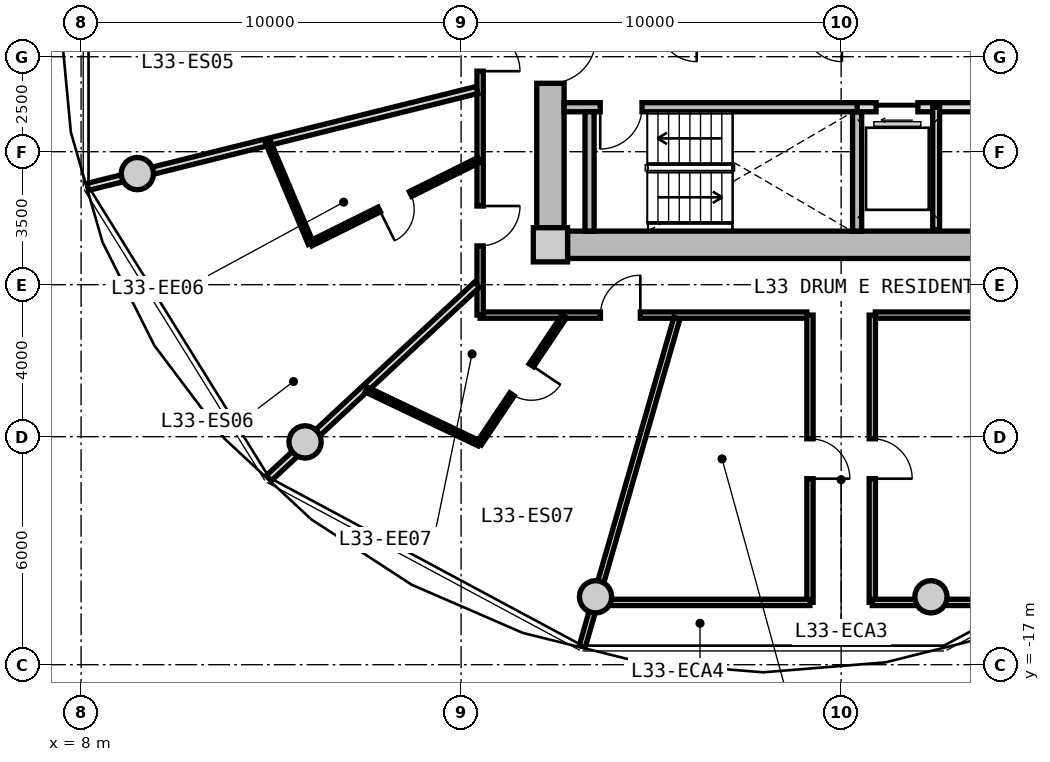
"""IFC4 building model, lengths in metres.
Left out: names, types, materials, properties, quantities, classifications, styles, units other than length and angle.
Written with IfcOpenShell. Run it as: python <this file> out.ifc"""

import sys

from ifc_helpers import new_model, si_unit, direction, frame, frame_2d, origin, origin_2d, place, context, subcontext, project, spatial, rectangle, circle, extrude, source, transform, mapped, element, fill, save


model = new_model("IFC4")
c1 = context("Model", 3, precision=1e-05, world=origin(), true_north=direction((0.0, 1.0)))
c2 = subcontext(c1, "Body", "Model", "MODEL_VIEW")
j1 = project(units=[si_unit("LENGTHUNIT", "METRE"), si_unit("PLANEANGLEUNIT", "RADIAN")], contexts=[c1])
p1 = place(None, origin())
s1 = spatial("IfcSite", under=j1, at=p1, CompositionType="ELEMENT")
p2 = place(p1, origin())
s2 = spatial("IfcBuilding", under=s1, at=p2, CompositionType="ELEMENT")
p3 = place(p2, frame((0.0, 0.0, 108.45)))
s3 = spatial("IfcBuildingStorey", under=s2, at=p3, CompositionType="ELEMENT", Elevation=108.45)
m1 = source(origin(), c2, "Body", "SweptSolid", [
    extrude(rectangle(XDim=0.9, YDim=0.9, at=origin_2d()), origin(), (0.0, 0.0, 1.0), 3.05),
])
p4 = place(p3, frame((20.35, -5.95, 0.0), z_axis=(0.0, 0.0, 1.0), x_axis=(1.0, 0.0, 0.0)))
e1 = element("IfcColumn", 1, at=p4, inside=s3, PredefinedType="COLUMN", context=c2, shape_type="MappedRepresentation", body=[
    mapped(m1, transform((0.0, 0.0, 0.0), x_axis=(1.0, 0.0, 0.0), y_axis=(0.0, 1.0, 0.0), z_axis=(0.0, 0.0, 1.0), scale=1.0)),
])
m2 = source(origin(), c2, "Body", "SweptSolid", [
    extrude(rectangle(XDim=14.4, YDim=0.72, at=frame_2d((7.2, 0.0))), origin(), (0.0, 0.0, 1.0), 2.79),
])
p5 = place(p3, frame((35.2, -5.95, 0.0), z_axis=(0.0, 0.0, 1.0), x_axis=(-1.0, 0.0, 0.0)))
e2 = element("IfcWall", 2, at=p5, inside=s3, PredefinedType="SHEAR", context=c2, shape_type="MappedRepresentation", body=[
    mapped(m2, transform((0.0, 0.0, 0.0), x_axis=(1.0, 0.0, 0.0), y_axis=(0.0, 1.0, 0.0), z_axis=(0.0, 0.0, 1.0), scale=1.0)),
])
m3 = source(origin(), c2, "Body", "SweptSolid", [
    extrude(rectangle(XDim=11.0, YDim=0.72, at=frame_2d((5.5, 0.0))), origin(), (0.0, 0.0, 1.0), 2.79),
])
p6 = place(p3, frame((20.35, -5.5, 0.0), z_axis=(0.0, 0.0, 1.0), x_axis=(0.0, 1.0, 0.0)))
e3 = element("IfcWall", 3, at=p6, inside=s3, PredefinedType="SHEAR", context=c2, shape_type="MappedRepresentation", body=[
    mapped(m3, transform((0.0, 0.0, 0.0), x_axis=(1.0, 0.0, 0.0), y_axis=(0.0, 1.0, 0.0), z_axis=(0.0, 0.0, 1.0), scale=1.0)),
])
p7 = place(p6, frame((3.8, 0.0, 0.0)))
e4 = element("IfcOpeningElement", 4, at=p7, cuts=e3, PredefinedType="OPENING", context=c2, shape_type="SweptSolid", body=[
    extrude(rectangle(XDim=1.2, YDim=2.15, at=frame_2d((0.6, 1.075))), frame((0.0, 0.37, 0.0), z_axis=(0.0, -1.0, 0.0), x_axis=(1.0, 0.0, 0.0)), (0.0, 0.0, 1.0), 0.74),
])
m4 = source(origin(), c2, "Body", "SweptSolid", [
    extrude(circle(Radius=0.425, at=origin_2d()), origin(), (0.0, 0.0, 1.0), 3.05),
])
for number, where, z_axis, x_axis in (
    (5, (9.481, -4.076, 0.0), (0.0, 0.0, 1.0), (1.0, 0.0, 0.0)),
    (6, (13.894, -11.137, 0.0), (0.0, 0.0, 1.0), (1.0, 0.0, 0.0)),
    (7, (21.537, -15.213, 0.0), (0.0, 0.0, 1.0), (1.0, 0.0, 0.0)),
    (8, (30.363, -15.213, 0.0), (0.0, 0.0, 1.0), (1.0, 0.0, 0.0)),
):
    element("IfcColumn", number, at=place(p3, frame(where, z_axis=z_axis, x_axis=x_axis)), inside=s3, PredefinedType="COLUMN", context=c2, shape_type="MappedRepresentation", body=[
        mapped(m4, transform((0.0, 0.0, 0.0), x_axis=(1.0, 0.0, 0.0), y_axis=(0.0, 1.0, 0.0), z_axis=(0.0, 0.0, 1.0), scale=1.0)),
    ])
m5 = source(origin(), c2, "Body", "SweptSolid", [
    extrude(rectangle(XDim=7.83, YDim=0.24, at=frame_2d((3.915, 0.0))), origin(), (0.0, 0.0, 1.0), 2.79),
])
p8 = place(p3, frame((20.71, -2.33, 0.0), z_axis=(0.0, 0.0, 1.0), x_axis=(1.0, 0.0, 0.0)))
e9 = element("IfcWall", 9, at=p8, inside=s3, PredefinedType="PARTITIONING", context=c2, shape_type="MappedRepresentation", body=[
    mapped(m5, transform((0.0, 0.0, 0.0), x_axis=(1.0, 0.0, 0.0), y_axis=(0.0, 1.0, 0.0), z_axis=(0.0, 0.0, 1.0), scale=1.0)),
])
p9 = place(p8, frame((0.95, 0.0, 0.0)))
e10 = element("IfcOpeningElement", 10, at=p9, cuts=e9, PredefinedType="OPENING", context=c2, shape_type="SweptSolid", body=[
    extrude(rectangle(XDim=1.1, YDim=2.15, at=frame_2d((0.55, 1.075))), frame((0.0, 0.13, 0.0), z_axis=(0.0, -1.0, 0.0), x_axis=(1.0, 0.0, 0.0)), (0.0, 0.0, 1.0), 0.26),
])
m6 = source(origin(), c2, "Body", "SweptSolid", [
    extrude(rectangle(XDim=3.14, YDim=0.24, at=frame_2d((1.57, 0.0))), origin(), (0.0, 0.0, 1.0), 2.79),
])
for number, where, z_axis, x_axis in (
    (11, (21.38, -5.59, 0.0), (0.0, 0.0, 1.0), (0.0, 1.0, 0.0)),
    (12, (28.42, -5.59, 0.0), (0.0, 0.0, 1.0), (0.0, 1.0, 0.0)),
):
    element("IfcWall", number, at=place(p3, frame(where, z_axis=z_axis, x_axis=x_axis)), inside=s3, PredefinedType="PARTITIONING", context=c2, shape_type="MappedRepresentation", body=[
        mapped(m6, transform((0.0, 0.0, 0.0), x_axis=(1.0, 0.0, 0.0), y_axis=(0.0, 1.0, 0.0), z_axis=(0.0, 0.0, 1.0), scale=1.0)),
    ])
m7 = source(origin(), c2, "Body", "SweptSolid", [
    extrude(rectangle(XDim=4.13, YDim=0.24, at=frame_2d((2.065, 0.0))), origin(), (0.0, 0.0, 1.0), 2.775),
])
p10 = place(p3, frame((28.42, -2.33, 0.0), z_axis=(0.0, 0.0, 1.0), x_axis=(1.0, 0.0, 0.0)))
e13 = element("IfcWall", 13, at=p10, inside=s3, PredefinedType="PARTITIONING", context=c2, shape_type="MappedRepresentation", body=[
    mapped(m7, transform((0.0, 0.0, 0.0), x_axis=(1.0, 0.0, 0.0), y_axis=(0.0, 1.0, 0.0), z_axis=(0.0, 0.0, 1.0), scale=1.0)),
])
p11 = place(p10, frame((0.5, 0.0, 0.0)))
e14 = element("IfcOpeningElement", 14, at=p11, cuts=e13, PredefinedType="OPENING", context=c2, shape_type="SweptSolid", body=[
    extrude(rectangle(XDim=1.1, YDim=2.2, at=frame_2d((0.55, 1.1))), frame((0.0, 0.13, 0.0), z_axis=(0.0, -1.0, 0.0), x_axis=(1.0, 0.0, 0.0)), (0.0, 0.0, 1.0), 0.26),
])
m8 = source(origin(), c2, "Body", "SweptSolid", [
    extrude(rectangle(XDim=3.22, YDim=0.18, at=frame_2d((1.61, 0.0))), origin(), (0.0, 0.0, 1.0), 2.775),
])
p12 = place(p3, frame((30.5, -5.55, 0.0), z_axis=(0.0, 0.0, 1.0), x_axis=(0.0, 1.0, 0.0)))
e15 = element("IfcWall", 15, at=p12, inside=s3, PredefinedType="PARTITIONING", context=c2, shape_type="MappedRepresentation", body=[
    mapped(m8, transform((0.0, 0.0, 0.0), x_axis=(1.0, 0.0, 0.0), y_axis=(0.0, 1.0, 0.0), z_axis=(0.0, 0.0, 1.0), scale=1.0)),
])
m9 = source(origin(), c2, "Body", "SweptSolid", [
    extrude(rectangle(XDim=8.6, YDim=0.165, at=frame_2d((4.3, 0.0))), origin(), (0.0, 0.0, 1.0), 2.775),
])
p13 = place(p3, frame((37.5, -7.8, 0.0), z_axis=(0.0, 0.0, 1.0), x_axis=(-1.0, 0.0, 0.0)))
e16 = element("IfcWall", 16, at=p13, inside=s3, PredefinedType="PARTITIONING", context=c2, shape_type="MappedRepresentation", body=[
    mapped(m9, transform((0.0, 0.0, 0.0), x_axis=(1.0, 0.0, 0.0), y_axis=(0.0, 1.0, 0.0), z_axis=(0.0, 0.0, 1.0), scale=1.0)),
])
p14 = place(p3, frame((27.1, -7.8, 0.0), z_axis=(0.0, 0.0, 1.0), x_axis=(-1.0, 0.0, 0.0)))
e17 = element("IfcWall", 17, at=p14, inside=s3, PredefinedType="PARTITIONING", context=c2, shape_type="MappedRepresentation", body=[
    mapped(m9, transform((0.0, 0.0, 0.0), x_axis=(1.0, 0.0, 0.0), y_axis=(0.0, 1.0, 0.0), z_axis=(0.0, 0.0, 1.0), scale=1.0)),
])
p15 = place(p14, frame((4.384, 0.0, 0.0)))
e18 = element("IfcOpeningElement", 18, at=p15, cuts=e17, PredefinedType="OPENING", context=c2, shape_type="SweptSolid", body=[
    extrude(rectangle(XDim=1.05, YDim=2.15, at=frame_2d((0.525, 1.075))), frame((0.0, 0.093, 0.0), z_axis=(0.0, -1.0, 0.0), x_axis=(1.0, 0.0, 0.0)), (0.0, 0.0, 1.0), 0.185),
])
m10 = source(origin(), c2, "Body", "SweptSolid", [
    extrude(rectangle(XDim=15.6, YDim=0.165, at=frame_2d((7.8, 0.0))), origin(), (0.0, 0.0, 1.0), 2.775),
])
p16 = place(p3, frame((18.5, -7.8, 0.0), z_axis=(0.0, 0.0, 1.0), x_axis=(0.0, 1.0, 0.0)))
e19 = element("IfcWall", 19, at=p16, inside=s3, PredefinedType="PARTITIONING", context=c2, shape_type="MappedRepresentation", body=[
    mapped(m10, transform((0.0, 0.0, 0.0), x_axis=(1.0, 0.0, 0.0), y_axis=(0.0, 1.0, 0.0), z_axis=(0.0, 0.0, 1.0), scale=1.0)),
])
p17 = place(p16, frame((10.383, 0.0, 0.0)))
e20 = element("IfcOpeningElement", 20, at=p17, cuts=e19, PredefinedType="OPENING", context=c2, shape_type="SweptSolid", body=[
    extrude(rectangle(XDim=1.05, YDim=2.15, at=frame_2d((0.525, 1.075))), frame((0.0, 0.093, 0.0), z_axis=(0.0, -1.0, 0.0), x_axis=(1.0, 0.0, 0.0)), (0.0, 0.0, 1.0), 0.185),
])
p18 = place(p16, frame((6.419, 0.0, 0.0)))
e21 = element("IfcOpeningElement", 21, at=p18, cuts=e19, PredefinedType="OPENING", context=c2, shape_type="SweptSolid", body=[
    extrude(rectangle(XDim=1.05, YDim=2.15, at=frame_2d((0.525, 1.075))), frame((0.0, 0.093, 0.0), z_axis=(0.0, -1.0, 0.0), x_axis=(1.0, 0.0, 0.0)), (0.0, 0.0, 1.0), 0.185),
])
p19 = place(p16, frame((1.821, 0.0, 0.0)))
e22 = element("IfcOpeningElement", 22, at=p19, cuts=e19, PredefinedType="OPENING", context=c2, shape_type="SweptSolid", body=[
    extrude(rectangle(XDim=1.05, YDim=2.15, at=frame_2d((0.525, 1.075))), frame((0.0, 0.093, 0.0), z_axis=(0.0, -1.0, 0.0), x_axis=(1.0, 0.0, 0.0)), (0.0, 0.0, 1.0), 0.185),
])
m11 = source(origin(), c2, "Body", "SweptSolid", [
    extrude(rectangle(XDim=8.989, YDim=0.165, at=frame_2d((4.495, 0.0))), origin(), (0.0, 0.0, 1.0), 2.275),
])
p20 = place(p3, frame((23.678, -7.88, 0.0), z_axis=(0.0, 0.0, 1.0), x_axis=(-0.27702323008, -0.960863221274, 0.0)))
e23 = element("IfcWall", 23, at=p20, inside=s3, PredefinedType="PARTITIONING", context=c2, shape_type="MappedRepresentation", body=[
    mapped(m11, transform((0.0, 0.0, 0.0), x_axis=(1.0, 0.0, 0.0), y_axis=(0.0, 1.0, 0.0), z_axis=(0.0, 0.0, 1.0), scale=1.0)),
])
m12 = source(origin(), c2, "Body", "SweptSolid", [
    extrude(rectangle(XDim=7.56, YDim=0.165, at=frame_2d((3.78, 0.0))), origin(), (0.0, 0.0, 1.0), 2.775),
])
p21 = place(p3, frame((27.18, -15.36, 0.0), z_axis=(0.0, 0.0, 1.0), x_axis=(0.0, 1.0, 0.0)))
e24 = element("IfcWall", 24, at=p21, inside=s3, PredefinedType="PARTITIONING", context=c2, shape_type="MappedRepresentation", body=[
    mapped(m12, transform((0.0, 0.0, 0.0), x_axis=(1.0, 0.0, 0.0), y_axis=(0.0, 1.0, 0.0), z_axis=(0.0, 0.0, 1.0), scale=1.0)),
])
p22 = place(p21, frame((3.255, 0.0, 0.0)))
e25 = element("IfcOpeningElement", 25, at=p22, cuts=e24, PredefinedType="OPENING", context=c2, shape_type="SweptSolid", body=[
    extrude(rectangle(XDim=1.05, YDim=2.15, at=frame_2d((0.525, 1.075))), frame((0.0, 0.093, 0.0), z_axis=(0.0, -1.0, 0.0), x_axis=(1.0, 0.0, 0.0)), (0.0, 0.0, 1.0), 0.185),
])
m13 = source(origin(), c2, "Body", "SweptSolid", [
    extrude(rectangle(XDim=5.814, YDim=0.165, at=frame_2d((2.907, 0.0))), origin(), (0.0, 0.0, 1.0), 2.275),
])
p23 = place(p3, frame((21.366, -15.36, 0.0), z_axis=(0.0, 0.0, 1.0), x_axis=(1.0, 0.0, 0.0)))
e26 = element("IfcWall", 26, at=p23, inside=s3, PredefinedType="PARTITIONING", context=c2, shape_type="MappedRepresentation", body=[
    mapped(m13, transform((0.0, 0.0, 0.0), x_axis=(1.0, 0.0, 0.0), y_axis=(0.0, 1.0, 0.0), z_axis=(0.0, 0.0, 1.0), scale=1.0)),
])
p24 = place(p3, frame((28.82, -15.36, 0.0), z_axis=(0.0, 0.0, 1.0), x_axis=(0.0, 1.0, 0.0)))
e27 = element("IfcWall", 27, at=p24, inside=s3, PredefinedType="PARTITIONING", context=c2, shape_type="MappedRepresentation", body=[
    mapped(m12, transform((0.0, 0.0, 0.0), x_axis=(1.0, 0.0, 0.0), y_axis=(0.0, 1.0, 0.0), z_axis=(0.0, 0.0, 1.0), scale=1.0)),
])
p25 = place(p24, frame((3.255, 0.0, 0.0)))
e28 = element("IfcOpeningElement", 28, at=p25, cuts=e27, PredefinedType="OPENING", context=c2, shape_type="SweptSolid", body=[
    extrude(rectangle(XDim=1.05, YDim=2.15, at=frame_2d((0.525, 1.075))), frame((0.0, 0.093, 0.0), z_axis=(0.0, -1.0, 0.0), x_axis=(1.0, 0.0, 0.0)), (0.0, 0.0, 1.0), 0.185),
])
m14 = source(origin(), c2, "Body", "SweptSolid", [
    extrude(rectangle(XDim=4.307, YDim=0.165, at=frame_2d((2.153, 0.0))), origin(), (0.0, 0.0, 1.0), 2.275),
])
p26 = place(p3, frame((28.82, -15.36, 0.0), z_axis=(0.0, 0.0, 1.0), x_axis=(1.0, 0.0, 0.0)))
e29 = element("IfcWall", 29, at=p26, inside=s3, PredefinedType="PARTITIONING", context=c2, shape_type="MappedRepresentation", body=[
    mapped(m14, transform((0.0, 0.0, 0.0), x_axis=(1.0, 0.0, 0.0), y_axis=(0.0, 1.0, 0.0), z_axis=(0.0, 0.0, 1.0), scale=1.0)),
])
m15 = source(origin(), c2, "Body", "SweptSolid", [
    extrude(rectangle(XDim=10.556, YDim=0.19, at=frame_2d((5.278, 0.0))), origin(), (0.0, 0.0, 1.0), 2.275),
])
p27 = place(p3, frame((18.42, -1.875, 0.0), z_axis=(0.0, 0.0, 1.0), x_axis=(-0.970363857851, -0.241648470667, 0.0)))
e30 = element("IfcWall", 30, at=p27, inside=s3, PredefinedType="PARTITIONING", context=c2, shape_type="MappedRepresentation", body=[
    mapped(m15, transform((0.0, 0.0, 0.0), x_axis=(1.0, 0.0, 0.0), y_axis=(0.0, 1.0, 0.0), z_axis=(0.0, 0.0, 1.0), scale=1.0)),
])
m16 = source(origin(), c2, "Body", "SweptSolid", [
    extrude(rectangle(XDim=7.482, YDim=0.19, at=frame_2d((3.741, 0.0))), origin(), (0.0, 0.0, 1.0), 2.275),
])
p28 = place(p3, frame((18.42, -6.998, 0.0), z_axis=(0.0, 0.0, 1.0), x_axis=(-0.732508698043, -0.680757671489, 0.0)))
e31 = element("IfcWall", 31, at=p28, inside=s3, PredefinedType="PARTITIONING", context=c2, shape_type="MappedRepresentation", body=[
    mapped(m16, transform((0.0, 0.0, 0.0), x_axis=(1.0, 0.0, 0.0), y_axis=(0.0, 1.0, 0.0), z_axis=(0.0, 0.0, 1.0), scale=1.0)),
])
m17 = source(origin(), c2, "Body", "SweptSolid", [
    extrude(rectangle(XDim=4.941, YDim=0.14, at=frame_2d((2.471, 0.0))), origin(), (0.0, 0.0, 1.0), 2.775),
])
p29 = place(p3, frame((18.47, -3.717, 0.0), z_axis=(0.0, 0.0, 1.0), x_axis=(-0.89555083256, -0.444959218694, 0.0)))
e32 = element("IfcWall", 32, at=p29, inside=s3, PredefinedType="PARTITIONING", context=c2, shape_type="MappedRepresentation", body=[
    mapped(m17, transform((0.0, 0.0, 0.0), x_axis=(1.0, 0.0, 0.0), y_axis=(0.0, 1.0, 0.0), z_axis=(0.0, 0.0, 1.0), scale=1.0)),
])
p30 = place(p29, frame((2.011, 0.0, 0.0)))
e33 = element("IfcOpeningElement", 33, at=p30, cuts=e32, PredefinedType="OPENING", context=c2, shape_type="SweptSolid", body=[
    extrude(rectangle(XDim=0.92, YDim=2.1, at=frame_2d((0.46, 1.05))), frame((0.0, 0.08, 0.0), z_axis=(0.0, -1.0, 0.0), x_axis=(1.0, 0.0, 0.0)), (0.0, 0.0, 1.0), 0.16),
])
m18 = source(origin(), c2, "Body", "SweptSolid", [
    extrude(rectangle(XDim=2.88, YDim=0.14, at=frame_2d((1.44, 0.0))), origin(), (0.0, 0.0, 1.0), 2.415),
])
p31 = place(p3, frame((14.045, -5.915, 0.0), z_axis=(0.0, 0.0, 1.0), x_axis=(-0.38878819597, 0.921327161585, 0.0)))
e34 = element("IfcWall", 34, at=p31, inside=s3, PredefinedType="PARTITIONING", context=c2, shape_type="MappedRepresentation", body=[
    mapped(m18, transform((0.0, 0.0, 0.0), x_axis=(1.0, 0.0, 0.0), y_axis=(0.0, 1.0, 0.0), z_axis=(0.0, 0.0, 1.0), scale=1.0)),
])
m19 = source(origin(), c2, "Body", "SweptSolid", [
    extrude(rectangle(XDim=4.027, YDim=0.14, at=frame_2d((2.014, 0.0))), origin(), (0.0, 0.0, 1.0), 2.775),
])
p32 = place(p3, frame((20.714, -7.83, 0.0), z_axis=(0.0, 0.0, 1.0), x_axis=(-0.555832825922, -0.831294093343, 0.0)))
e35 = element("IfcWall", 35, at=p32, inside=s3, PredefinedType="PARTITIONING", context=c2, shape_type="MappedRepresentation", body=[
    mapped(m19, transform((0.0, 0.0, 0.0), x_axis=(1.0, 0.0, 0.0), y_axis=(0.0, 1.0, 0.0), z_axis=(0.0, 0.0, 1.0), scale=1.0)),
])
p33 = place(p32, frame((1.554, 0.0, 0.0)))
e36 = element("IfcOpeningElement", 36, at=p33, cuts=e35, PredefinedType="OPENING", context=c2, shape_type="SweptSolid", body=[
    extrude(rectangle(XDim=0.92, YDim=2.1, at=frame_2d((0.46, 1.05))), frame((0.0, 0.08, 0.0), z_axis=(0.0, -1.0, 0.0), x_axis=(1.0, 0.0, 0.0)), (0.0, 0.0, 1.0), 0.16),
])
m20 = source(origin(), c2, "Body", "SweptSolid", [
    extrude(rectangle(XDim=3.291, YDim=0.14, at=frame_2d((1.646, 0.0))), origin(), (0.0, 0.0, 1.0), 2.775),
])
p34 = place(p3, frame((18.476, -11.178, 0.0), z_axis=(0.0, 0.0, 1.0), x_axis=(-0.902381393443, 0.430938302739, 0.0)))
e37 = element("IfcWall", 37, at=p34, inside=s3, PredefinedType="PARTITIONING", context=c2, shape_type="MappedRepresentation", body=[
    mapped(m20, transform((0.0, 0.0, 0.0), x_axis=(1.0, 0.0, 0.0), y_axis=(0.0, 1.0, 0.0), z_axis=(0.0, 0.0, 1.0), scale=1.0)),
])
m21 = source(origin(), c2, "Body", "SweptSolid", [
    extrude(rectangle(XDim=1.1, YDim=2.15, at=frame_2d((0.55, 1.075))), frame((0.0, 0.025, 0.0), z_axis=(0.0, -1.0, 0.0), x_axis=(1.0, 0.0, 0.0)), (0.0, 0.0, 1.0), 0.05),
])
p35 = place(p9, frame((1.1, 0.0, 0.0), z_axis=(0.0, 0.0, 1.0), x_axis=(-1.0, 0.0, 0.0)))
e38 = element("IfcDoor", 38, at=p35, inside=s3, OperationType="SINGLE_SWING_RIGHT", PredefinedType="DOOR", context=c2, shape_type="MappedRepresentation", body=[
    mapped(m21, transform((0.0, 0.0, 0.0), x_axis=(1.0, 0.0, 0.0), y_axis=(0.0, 1.0, 0.0), z_axis=(0.0, 0.0, 1.0), scale=1.0)),
])
fill(e10, e38)
m22 = source(origin(), c2, "Body", "SweptSolid", [
    extrude(rectangle(XDim=1.2, YDim=2.15, at=frame_2d((0.6, 1.075))), frame((0.0, 0.025, 0.0), z_axis=(0.0, -1.0, 0.0), x_axis=(1.0, 0.0, 0.0)), (0.0, 0.0, 1.0), 0.05),
])
p36 = place(p7, frame((1.2, 0.0, 0.0), z_axis=(0.0, 0.0, 1.0), x_axis=(-1.0, 0.0, 0.0)))
e39 = element("IfcDoor", 39, at=p36, inside=s3, OperationType="SINGLE_SWING_LEFT", PredefinedType="DOOR", context=c2, shape_type="MappedRepresentation", body=[
    mapped(m22, transform((0.0, 0.0, 0.0), x_axis=(1.0, 0.0, 0.0), y_axis=(0.0, 1.0, 0.0), z_axis=(0.0, 0.0, 1.0), scale=1.0)),
])
fill(e4, e39)
m23 = source(origin(), c2, "Body", "SweptSolid", [
    extrude(rectangle(XDim=1.1, YDim=2.2, at=frame_2d((0.55, 1.1))), frame((0.0, 0.025, 0.0), z_axis=(0.0, -1.0, 0.0), x_axis=(1.0, 0.0, 0.0)), (0.0, 0.0, 1.0), 0.05),
])
p37 = place(p11, frame((1.1, 0.0, 0.0), z_axis=(0.0, 0.0, 1.0), x_axis=(-1.0, 0.0, 0.0)))
e40 = element("IfcDoor", 40, at=p37, inside=s3, OperationType="SLIDING_TO_LEFT", PredefinedType="DOOR", context=c2, shape_type="MappedRepresentation", body=[
    mapped(m23, transform((0.0, 0.0, 0.0), x_axis=(1.0, 0.0, 0.0), y_axis=(0.0, 1.0, 0.0), z_axis=(0.0, 0.0, 1.0), scale=1.0)),
])
fill(e14, e40)
m24 = source(origin(), c2, "Body", "SweptSolid", [
    extrude(rectangle(XDim=1.05, YDim=2.15, at=frame_2d((0.525, 1.075))), frame((0.0, 0.025, 0.0), z_axis=(0.0, -1.0, 0.0), x_axis=(1.0, 0.0, 0.0)), (0.0, 0.0, 1.0), 0.05),
])
p38 = place(p22, frame((1.05, 0.0, 0.0), z_axis=(0.0, 0.0, 1.0), x_axis=(-1.0, 0.0, 0.0)))
e41 = element("IfcDoor", 41, at=p38, inside=s3, OperationType="SINGLE_SWING_RIGHT", PredefinedType="DOOR", context=c2, shape_type="MappedRepresentation", body=[
    mapped(m24, transform((0.0, 0.0, 0.0), x_axis=(1.0, 0.0, 0.0), y_axis=(0.0, 1.0, 0.0), z_axis=(0.0, 0.0, 1.0), scale=1.0)),
])
fill(e25, e41)
p39 = place(p25, frame((1.05, 0.0, 0.0), z_axis=(0.0, 0.0, 1.0), x_axis=(-1.0, 0.0, 0.0)))
e42 = element("IfcDoor", 42, at=p39, inside=s3, OperationType="SINGLE_SWING_RIGHT", PredefinedType="DOOR", context=c2, shape_type="MappedRepresentation", body=[
    mapped(m24, transform((0.0, 0.0, 0.0), x_axis=(1.0, 0.0, 0.0), y_axis=(0.0, 1.0, 0.0), z_axis=(0.0, 0.0, 1.0), scale=1.0)),
])
fill(e28, e42)
p40 = place(p18, frame((1.05, 0.0, 0.0), z_axis=(0.0, 0.0, 1.0), x_axis=(-1.0, 0.0, 0.0)))
e43 = element("IfcDoor", 43, at=p40, inside=s3, OperationType="SINGLE_SWING_RIGHT", PredefinedType="DOOR", context=c2, shape_type="MappedRepresentation", body=[
    mapped(m24, transform((0.0, 0.0, 0.0), x_axis=(1.0, 0.0, 0.0), y_axis=(0.0, 1.0, 0.0), z_axis=(0.0, 0.0, 1.0), scale=1.0)),
])
fill(e21, e43)
p41 = place(p19, frame((1.05, 0.0, 0.0), z_axis=(0.0, 0.0, 1.0), x_axis=(-1.0, 0.0, 0.0)))
e44 = element("IfcDoor", 44, at=p41, inside=s3, OperationType="SINGLE_SWING_LEFT", PredefinedType="DOOR", context=c2, shape_type="MappedRepresentation", body=[
    mapped(m24, transform((0.0, 0.0, 0.0), x_axis=(1.0, 0.0, 0.0), y_axis=(0.0, 1.0, 0.0), z_axis=(0.0, 0.0, 1.0), scale=1.0)),
])
fill(e22, e44)
m25 = source(origin(), c2, "Body", "SweptSolid", [
    extrude(rectangle(XDim=0.92, YDim=2.1, at=frame_2d((0.46, 1.05))), frame((0.0, 0.025, 0.0), z_axis=(0.0, -1.0, 0.0), x_axis=(1.0, 0.0, 0.0)), (0.0, 0.0, 1.0), 0.05),
])
p42 = place(p30, origin())
e45 = element("IfcDoor", 45, at=p42, inside=s3, OperationType="SINGLE_SWING_RIGHT", PredefinedType="DOOR", context=c2, shape_type="MappedRepresentation", body=[
    mapped(m25, transform((0.0, 0.0, 0.0), x_axis=(1.0, 0.0, 0.0), y_axis=(0.0, 1.0, 0.0), z_axis=(0.0, 0.0, 1.0), scale=1.0)),
])
fill(e33, e45)
p43 = place(p15, frame((1.05, 0.0, 0.0), z_axis=(0.0, 0.0, 1.0), x_axis=(-1.0, 0.0, 0.0)))
e46 = element("IfcDoor", 46, at=p43, inside=s3, OperationType="SINGLE_SWING_RIGHT", PredefinedType="DOOR", context=c2, shape_type="MappedRepresentation", body=[
    mapped(m24, transform((0.0, 0.0, 0.0), x_axis=(1.0, 0.0, 0.0), y_axis=(0.0, 1.0, 0.0), z_axis=(0.0, 0.0, 1.0), scale=1.0)),
])
fill(e18, e46)
p44 = place(p33, origin())
e47 = element("IfcDoor", 47, at=p44, inside=s3, OperationType="SINGLE_SWING_LEFT", PredefinedType="DOOR", context=c2, shape_type="MappedRepresentation", body=[
    mapped(m25, transform((0.0, 0.0, 0.0), x_axis=(1.0, 0.0, 0.0), y_axis=(0.0, 1.0, 0.0), z_axis=(0.0, 0.0, 1.0), scale=1.0)),
])
fill(e36, e47)
save(model, sys.argv[1])
